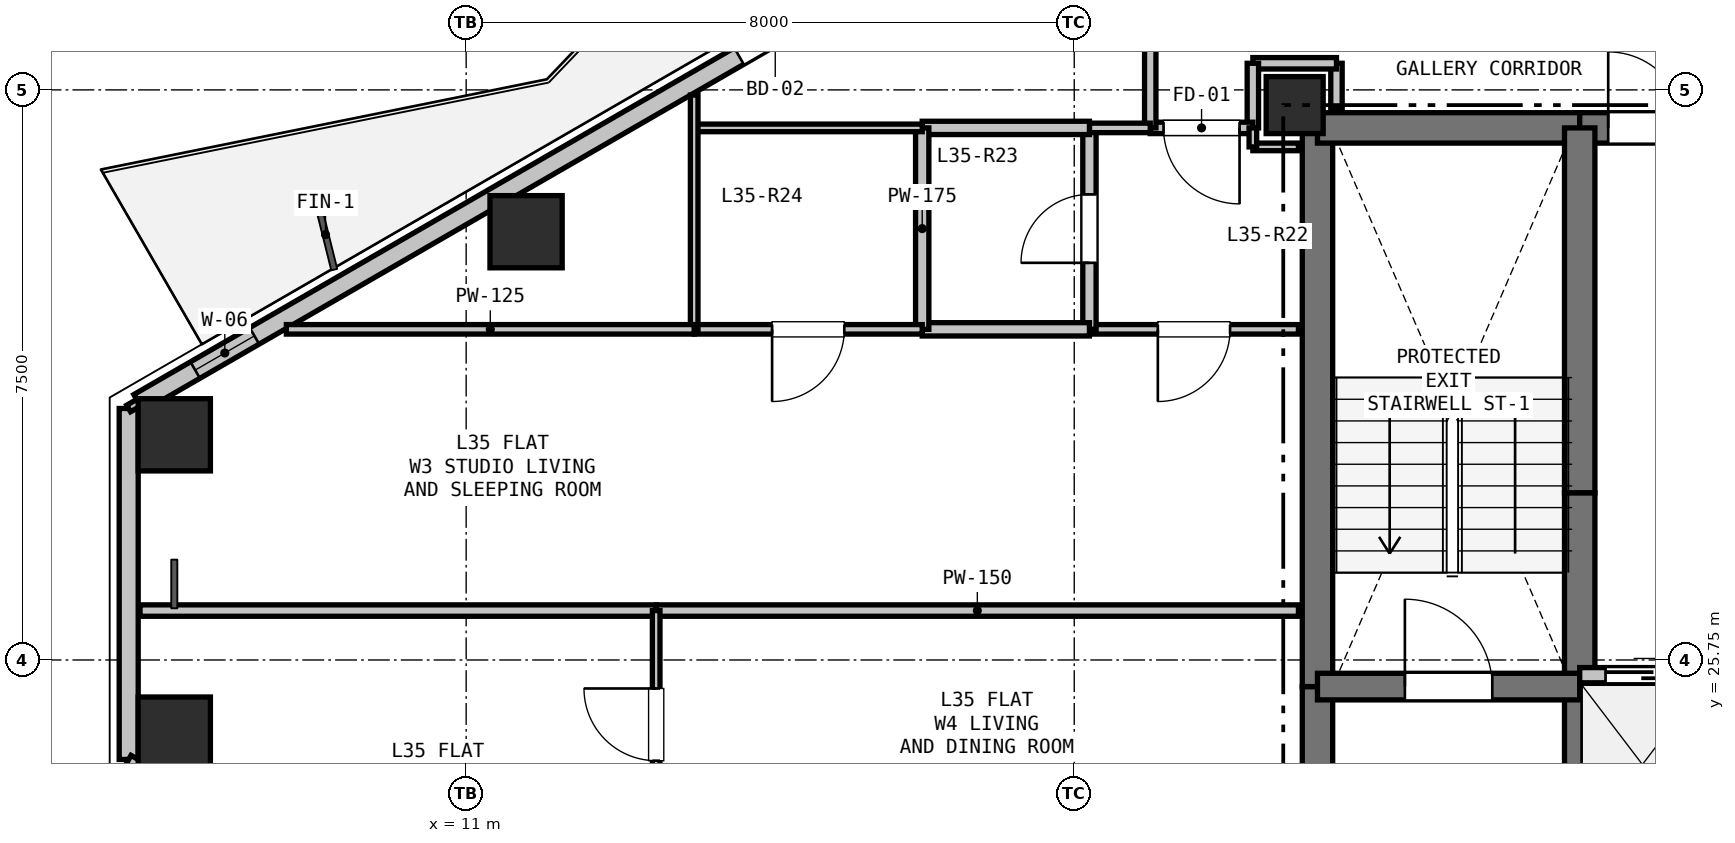
"""IFC4 building model, lengths in metres.
Left out: names, types, materials, properties, quantities, classifications, styles, units other than length and angle.
Written with IfcOpenShell. Run it as: python <this file> out.ifc"""

import sys

from ifc_helpers import new_model, si_unit, direction, frame, frame_2d, origin, origin_2d, place, context, subcontext, project, spatial, rectangle, hollow_rectangle, extrude, element, fill, save


model = new_model("IFC4")
c1 = context("Model", 3, precision=1e-05, world=origin(), true_north=direction((0.0, 1.0)))
c2 = subcontext(c1, "Body", "Model", "MODEL_VIEW")
j1 = project(units=[si_unit("LENGTHUNIT", "METRE"), si_unit("PLANEANGLEUNIT", "RADIAN")], contexts=[c1])
p1 = place(None, origin())
s1 = spatial("IfcSite", under=j1, at=p1, CompositionType="ELEMENT")
p2 = place(p1, origin())
s2 = spatial("IfcBuilding", under=s1, at=p2, CompositionType="ELEMENT")
p3 = place(p2, frame((0.0, 0.0, 127.8)))
s3 = spatial("IfcBuildingStorey", under=s2, at=p3, CompositionType="ELEMENT", Elevation=127.8)
p4 = place(p3, frame((21.9, 33.05, 0.0), z_axis=(0.0, 0.0, 1.0), x_axis=(1.0, 0.0, 0.0)))
e1 = element("IfcColumn", 1, at=p4, inside=s3, PredefinedType="COLUMN", context=c2, shape_type="SweptSolid", body=[
    extrude(rectangle(XDim=0.75, YDim=0.75, at=origin_2d()), origin(), (0.0, 0.0, 1.0), 3.3),
])
for number, where, z_axis, x_axis in (
    (2, (7.16, 28.712, 0.0), (0.0, 0.0, 1.0), (1.0, 0.0, 0.0)),
    (3, (11.788, 31.384, 0.0), (0.0, 0.0, 1.0), (1.0, 0.0, 0.0)),
    (4, (7.16, 24.788, 0.0), (0.0, 0.0, 1.0), (1.0, 0.0, 0.0)),
):
    element("IfcColumn", number, at=place(p3, frame(where, z_axis=z_axis, x_axis=x_axis)), inside=s3, PredefinedType="COLUMN", context=c2, shape_type="SweptSolid", body=[
        extrude(hollow_rectangle(XDim=0.95, YDim=0.95, WallThickness=0.028, at=origin_2d()), origin(), (0.0, 0.0, 1.0), 3.3),
    ])
p5 = place(p3, frame((6.56, 24.441, 0.0), z_axis=(0.0, 0.0, 1.0), x_axis=(0.0, 1.0, 0.0)))
e5 = element("IfcWall", 5, at=p5, inside=s3, PredefinedType="SOLIDWALL", context=c2, shape_type="SweptSolid", body=[
    extrude(rectangle(XDim=4.617, YDim=0.25, at=frame_2d((2.309, 0.0))), origin(), (0.0, 0.0, 1.0), 2.68),
])
p6 = place(p3, frame((6.69, 29.134, 0.0), z_axis=(0.0, 0.0, 1.0), x_axis=(0.866027848477, 0.499995765644, 0.0)))
e6 = element("IfcWall", 6, at=p6, inside=s3, PredefinedType="SOLIDWALL", context=c2, shape_type="SweptSolid", body=[
    extrude(rectangle(XDim=11.186, YDim=0.25, at=frame_2d((5.593, 0.0))), origin(), (0.0, 0.0, 1.0), 2.68),
])
p7 = place(p6, frame((9.122, 0.0, 0.0)))
e7 = element("IfcOpeningElement", 7, at=p7, cuts=e6, PredefinedType="OPENING", context=c2, shape_type="SweptSolid", body=[
    extrude(rectangle(XDim=1.1, YDim=2.1, at=frame_2d((0.55, 1.05))), frame((0.0, 0.135, 0.0), z_axis=(0.0, -1.0, 0.0), x_axis=(1.0, 0.0, 0.0)), (0.0, 0.0, 1.0), 0.27),
])
p8 = place(p6, frame((0.86, 0.0, 0.9)))
e8 = element("IfcOpeningElement", 8, at=p8, cuts=e6, PredefinedType="OPENING", context=c2, shape_type="SweptSolid", body=[
    extrude(rectangle(XDim=0.9, YDim=1.4, at=frame_2d((0.45, 0.7))), frame((0.0, 0.135, 0.0), z_axis=(0.0, -1.0, 0.0), x_axis=(1.0, 0.0, 0.0)), (0.0, 0.0, 1.0), 0.27),
])
p9 = place(p3, frame((16.378, 18.773, 0.0), z_axis=(0.0, 0.0, 1.0), x_axis=(-0.866027848477, 0.499995765644, 0.0)))
e9 = element("IfcWall", 9, at=p9, inside=s3, PredefinedType="SOLIDWALL", context=c2, shape_type="SweptSolid", body=[
    extrude(rectangle(XDim=11.186, YDim=0.25, at=frame_2d((5.593, 0.0))), origin(), (0.0, 0.0, 1.0), 2.68),
])
p10 = place(p9, frame((6.757, 0.0, 0.9)))
e10 = element("IfcOpeningElement", 10, at=p10, cuts=e9, PredefinedType="OPENING", context=c2, shape_type="SweptSolid", body=[
    extrude(rectangle(XDim=1.2, YDim=1.4, at=frame_2d((0.6, 0.7))), frame((0.0, 0.135, 0.0), z_axis=(0.0, -1.0, 0.0), x_axis=(1.0, 0.0, 0.0)), (0.0, 0.0, 1.0), 0.27),
])
p11 = place(p3, frame((22.2, 20.75, 0.0), z_axis=(0.0, 0.0, 1.0), x_axis=(0.0, 1.0, 0.0)))
e11 = element("IfcWall", 11, at=p11, inside=s3, PredefinedType="SHEAR", context=c2, shape_type="SweptSolid", body=[
    extrude(rectangle(XDim=4.65, YDim=0.4, at=frame_2d((2.325, 0.0))), origin(), (0.0, 0.0, 1.0), 3.06),
])
p12 = place(p3, frame((22.2, 25.4, 0.0), z_axis=(0.0, 0.0, 1.0), x_axis=(0.0, 1.0, 0.0)))
e12 = element("IfcWall", 12, at=p12, inside=s3, PredefinedType="SHEAR", context=c2, shape_type="SweptSolid", body=[
    extrude(rectangle(XDim=7.35, YDim=0.4, at=frame_2d((3.675, 0.0))), origin(), (0.0, 0.0, 1.0), 3.06),
])
p13 = place(p3, frame((22.2, 32.75, 0.0), z_axis=(0.0, 0.0, 1.0), x_axis=(1.0, 0.0, 0.0)))
e13 = element("IfcWall", 13, at=p13, inside=s3, PredefinedType="SHEAR", context=c2, shape_type="SweptSolid", body=[
    extrude(rectangle(XDim=3.45, YDim=0.4, at=frame_2d((1.725, 0.0))), origin(), (0.0, 0.0, 1.0), 3.06),
])
p14 = place(p3, frame((25.65, 32.75, 0.0), z_axis=(0.0, 0.0, 1.0), x_axis=(1.0, 0.0, 0.0)))
e14 = element("IfcWall", 14, at=p14, inside=s3, PredefinedType="SHEAR", context=c2, shape_type="SweptSolid", body=[
    extrude(rectangle(XDim=1.75, YDim=0.4, at=frame_2d((0.875, 0.0))), origin(), (0.0, 0.0, 1.0), 3.06),
])
p15 = place(p14, frame((0.375, 0.0, 0.0)))
e15 = element("IfcOpeningElement", 15, at=p15, cuts=e14, PredefinedType="OPENING", context=c2, shape_type="SweptSolid", body=[
    extrude(rectangle(XDim=1.0, YDim=2.15, at=frame_2d((0.5, 1.075))), frame((0.0, 0.21, 0.0), z_axis=(0.0, -1.0, 0.0), x_axis=(1.0, 0.0, 0.0)), (0.0, 0.0, 1.0), 0.42),
])
p16 = place(p3, frame((25.65, 22.75, 0.0), z_axis=(0.0, 0.0, 1.0), x_axis=(0.0, 1.0, 0.0)))
e16 = element("IfcWall", 16, at=p16, inside=s3, PredefinedType="SHEAR", context=c2, shape_type="SweptSolid", body=[
    extrude(rectangle(XDim=2.8, YDim=0.4, at=frame_2d((1.4, 0.0))), origin(), (0.0, 0.0, 1.0), 3.06),
])
p17 = place(p3, frame((25.65, 25.55, 0.0), z_axis=(0.0, 0.0, 1.0), x_axis=(0.0, 1.0, 0.0)))
e17 = element("IfcWall", 17, at=p17, inside=s3, PredefinedType="SHEAR", context=c2, shape_type="SweptSolid", body=[
    extrude(rectangle(XDim=2.4, YDim=0.4, at=frame_2d((1.2, 0.0))), origin(), (0.0, 0.0, 1.0), 3.06),
])
p18 = place(p3, frame((25.65, 27.95, 0.0), z_axis=(0.0, 0.0, 1.0), x_axis=(0.0, 1.0, 0.0)))
e18 = element("IfcWall", 18, at=p18, inside=s3, PredefinedType="SHEAR", context=c2, shape_type="SweptSolid", body=[
    extrude(rectangle(XDim=4.8, YDim=0.4, at=frame_2d((2.4, 0.0))), origin(), (0.0, 0.0, 1.0), 3.06),
])
p19 = place(p3, frame((22.2, 25.4, 0.0), z_axis=(0.0, 0.0, 1.0), x_axis=(1.0, 0.0, 0.0)))
e19 = element("IfcWall", 19, at=p19, inside=s3, PredefinedType="SHEAR", context=c2, shape_type="SweptSolid", body=[
    extrude(rectangle(XDim=3.45, YDim=0.35, at=frame_2d((1.725, 0.0))), origin(), (0.0, 0.0, 1.0), 3.06),
])
p20 = place(p19, frame((1.15, 0.0, 0.0)))
e20 = element("IfcOpeningElement", 20, at=p20, cuts=e19, PredefinedType="OPENING", context=c2, shape_type="SweptSolid", body=[
    extrude(rectangle(XDim=1.15, YDim=2.15, at=frame_2d((0.575, 1.075))), frame((0.0, 0.185, 0.0), z_axis=(0.0, -1.0, 0.0), x_axis=(1.0, 0.0, 0.0)), (0.0, 0.0, 1.0), 0.37),
])
p21 = place(p3, frame((25.65, 25.55, 0.0), z_axis=(0.0, 0.0, 1.0), x_axis=(1.0, 0.0, 0.0)))
e21 = element("IfcWall", 21, at=p21, inside=s3, PredefinedType="PARTITIONING", context=c2, shape_type="SweptSolid", body=[
    extrude(rectangle(XDim=4.95, YDim=0.2, at=frame_2d((2.475, 0.0))), origin(), (0.0, 0.0, 1.0), 3.06),
])
p22 = place(p21, frame((0.34, 0.0, 0.0)))
e22 = element("IfcOpeningElement", 22, at=p22, cuts=e21, PredefinedType="OPENING", context=c2, shape_type="SweptSolid", body=[
    extrude(rectangle(XDim=1.1, YDim=2.15, at=frame_2d((0.55, 1.075))), frame((0.0, 0.11, 0.0), z_axis=(0.0, -1.0, 0.0), x_axis=(1.0, 0.0, 0.0)), (0.0, 0.0, 1.0), 0.22),
])
p23 = place(p21, frame((1.99, 0.0, 0.0)))
e23 = element("IfcOpeningElement", 23, at=p23, cuts=e21, PredefinedType="OPENING", context=c2, shape_type="SweptSolid", body=[
    extrude(rectangle(XDim=1.1, YDim=2.15, at=frame_2d((0.55, 1.075))), frame((0.0, 0.11, 0.0), z_axis=(0.0, -1.0, 0.0), x_axis=(1.0, 0.0, 0.0)), (0.0, 0.0, 1.0), 0.22),
])
p24 = place(p21, frame((3.64, 0.0, 0.0)))
e24 = element("IfcOpeningElement", 24, at=p24, cuts=e21, PredefinedType="OPENING", context=c2, shape_type="SweptSolid", body=[
    extrude(rectangle(XDim=1.1, YDim=2.15, at=frame_2d((0.55, 1.075))), frame((0.0, 0.11, 0.0), z_axis=(0.0, -1.0, 0.0), x_axis=(1.0, 0.0, 0.0)), (0.0, 0.0, 1.0), 0.22),
])
p25 = place(p3, frame((22.45, 33.0, 0.0), z_axis=(0.0, 0.0, 1.0), x_axis=(0.0, 1.0, 0.0)))
e25 = element("IfcWall", 25, at=p25, inside=s3, PredefinedType="PARTITIONING", context=c2, shape_type="SweptSolid", body=[
    extrude(rectangle(XDim=0.6, YDim=0.15, at=frame_2d((0.3, 0.0))), origin(), (0.0, 0.0, 1.0), 2.508),
])
p26 = place(p3, frame((22.45, 33.6, 0.0), z_axis=(0.0, 0.0, 1.0), x_axis=(-1.0, 0.0, 0.0)))
e26 = element("IfcWall", 26, at=p26, inside=s3, PredefinedType="PARTITIONING", context=c2, shape_type="SweptSolid", body=[
    extrude(rectangle(XDim=1.1, YDim=0.15, at=frame_2d((0.55, 0.0))), origin(), (0.0, 0.0, 1.0), 3.06),
])
p27 = place(p3, frame((21.35, 33.6, 0.0), z_axis=(0.0, 0.0, 1.0), x_axis=(0.0, -1.0, 0.0)))
e27 = element("IfcWall", 27, at=p27, inside=s3, PredefinedType="PARTITIONING", context=c2, shape_type="SweptSolid", body=[
    extrude(rectangle(XDim=0.85, YDim=0.15, at=frame_2d((0.425, 0.0))), origin(), (0.0, 0.0, 1.0), 2.433),
])
p28 = place(p3, frame((21.35, 32.75, 0.0), z_axis=(0.0, 0.0, 1.0), x_axis=(-1.0, 0.0, 0.0)))
e28 = element("IfcWall", 28, at=p28, inside=s3, PredefinedType="PARTITIONING", context=c2, shape_type="SweptSolid", body=[
    extrude(rectangle(XDim=1.35, YDim=0.15, at=frame_2d((0.675, 0.0))), origin(), (0.0, 0.0, 1.0), 2.433),
])
p29 = place(p28, frame((0.175, 0.0, 0.0)))
e29 = element("IfcOpeningElement", 29, at=p29, cuts=e28, PredefinedType="OPENING", context=c2, shape_type="SweptSolid", body=[
    extrude(rectangle(XDim=1.0, YDim=2.15, at=frame_2d((0.5, 1.075))), frame((0.0, 0.085, 0.0), z_axis=(0.0, -1.0, 0.0), x_axis=(1.0, 0.0, 0.0)), (0.0, 0.0, 1.0), 0.17),
])
p30 = place(p3, frame((20.0, 32.75, 0.0), z_axis=(0.0, 0.0, 1.0), x_axis=(0.0, 1.0, 0.0)))
e30 = element("IfcWall", 30, at=p30, inside=s3, PredefinedType="PARTITIONING", context=c2, shape_type="SweptSolid", body=[
    extrude(rectangle(XDim=2.6, YDim=0.15, at=frame_2d((1.3, 0.0))), origin(), (0.0, 0.0, 1.0), 2.433),
])
p31 = place(p3, frame((21.35, 32.5, 0.0), z_axis=(0.0, 0.0, 1.0), x_axis=(1.0, 0.0, 0.0)))
e31 = element("IfcWall", 31, at=p31, inside=s3, PredefinedType="PARTITIONING", context=c2, shape_type="SweptSolid", body=[
    extrude(rectangle(XDim=0.6, YDim=0.1, at=frame_2d((0.3, 0.0))), origin(), (0.0, 0.0, 1.0), 2.508),
])
p32 = place(p3, frame((21.95, 30.1, 0.0), z_axis=(0.0, 0.0, 1.0), x_axis=(-1.0, 0.0, 0.0)))
e32 = element("IfcWall", 32, at=p32, inside=s3, PredefinedType="PARTITIONING", context=c2, shape_type="SweptSolid", body=[
    extrude(rectangle(XDim=2.75, YDim=0.125, at=frame_2d((1.375, 0.0))), origin(), (0.0, 0.0, 1.0), 2.508),
])
p33 = place(p32, frame((0.9, 0.0, 0.0)))
e33 = element("IfcOpeningElement", 33, at=p33, cuts=e32, PredefinedType="OPENING", context=c2, shape_type="SweptSolid", body=[
    extrude(rectangle(XDim=0.95, YDim=2.1, at=frame_2d((0.475, 1.05))), frame((0.0, 0.073, 0.0), z_axis=(0.0, -1.0, 0.0), x_axis=(1.0, 0.0, 0.0)), (0.0, 0.0, 1.0), 0.145),
])
p34 = place(p3, frame((19.2, 30.1, 0.0), z_axis=(0.0, 0.0, 1.0), x_axis=(0.0, 1.0, 0.0)))
e34 = element("IfcWall", 34, at=p34, inside=s3, PredefinedType="PLUMBINGWALL", context=c2, shape_type="SweptSolid", body=[
    extrude(rectangle(XDim=2.65, YDim=0.175, at=frame_2d((1.325, 0.0))), origin(), (0.0, 0.0, 1.0), 2.433),
])
p35 = place(p34, frame((0.875, 0.0, 0.0)))
e35 = element("IfcOpeningElement", 35, at=p35, cuts=e34, PredefinedType="OPENING", context=c2, shape_type="SweptSolid", body=[
    extrude(rectangle(XDim=0.9, YDim=2.1, at=frame_2d((0.45, 1.05))), frame((0.0, 0.097, 0.0), z_axis=(0.0, -1.0, 0.0), x_axis=(1.0, 0.0, 0.0)), (0.0, 0.0, 1.0), 0.195),
])
p36 = place(p3, frame((19.2, 32.75, 0.0), z_axis=(0.0, 0.0, 1.0), x_axis=(1.0, 0.0, 0.0)))
e36 = element("IfcWall", 36, at=p36, inside=s3, PredefinedType="PARTITIONING", context=c2, shape_type="SweptSolid", body=[
    extrude(rectangle(XDim=0.8, YDim=0.125, at=frame_2d((0.4, 0.0))), origin(), (0.0, 0.0, 1.0), 2.433),
])
p37 = place(p3, frame((21.35, 32.75, 0.0), z_axis=(0.0, 0.0, 1.0), x_axis=(0.0, -1.0, 0.0)))
e37 = element("IfcWall", 37, at=p37, inside=s3, PredefinedType="PARTITIONING", context=c2, shape_type="SweptSolid", body=[
    extrude(rectangle(XDim=0.25, YDim=0.1, at=frame_2d((0.125, 0.0))), origin(), (0.0, 0.0, 1.0), 3.06),
])
p38 = place(p3, frame((17.0, 32.75, 0.0), z_axis=(0.0, 0.0, 1.0), x_axis=(1.0, 0.0, 0.0)))
e38 = element("IfcWall", 38, at=p38, inside=s3, PredefinedType="PLUMBINGWALL", context=c2, shape_type="SweptSolid", body=[
    extrude(rectangle(XDim=2.2, YDim=0.175, at=frame_2d((1.1, 0.0))), origin(), (0.0, 0.0, 1.0), 2.433),
])
p39 = place(p3, frame((19.2, 30.1, 0.0), z_axis=(0.0, 0.0, 1.0), x_axis=(-1.0, 0.0, 0.0)))
e39 = element("IfcWall", 39, at=p39, inside=s3, PredefinedType="PLUMBINGWALL", context=c2, shape_type="SweptSolid", body=[
    extrude(rectangle(XDim=2.2, YDim=0.175, at=frame_2d((1.1, 0.0))), origin(), (0.0, 0.0, 1.0), 3.06),
])
p40 = place(p3, frame((17.0, 30.1, 0.0), z_axis=(0.0, 0.0, 1.0), x_axis=(0.0, 1.0, 0.0)))
e40 = element("IfcWall", 40, at=p40, inside=s3, PredefinedType="PLUMBINGWALL", context=c2, shape_type="SweptSolid", body=[
    extrude(rectangle(XDim=2.65, YDim=0.175, at=frame_2d((1.325, 0.0))), origin(), (0.0, 0.0, 1.0), 2.433),
])
p41 = place(p3, frame((14.0, 32.75, 0.0), z_axis=(0.0, 0.0, 1.0), x_axis=(1.0, 0.0, 0.0)))
e41 = element("IfcWall", 41, at=p41, inside=s3, PredefinedType="PARTITIONING", context=c2, shape_type="SweptSolid", body=[
    extrude(rectangle(XDim=3.0, YDim=0.1, at=frame_2d((1.5, 0.0))), origin(), (0.0, 0.0, 1.0), 2.365),
])
p42 = place(p3, frame((17.0, 30.1, 0.0), z_axis=(0.0, 0.0, 1.0), x_axis=(-1.0, 0.0, 0.0)))
e42 = element("IfcWall", 42, at=p42, inside=s3, PredefinedType="PARTITIONING", context=c2, shape_type="SweptSolid", body=[
    extrude(rectangle(XDim=3.0, YDim=0.125, at=frame_2d((1.5, 0.0))), origin(), (0.0, 0.0, 1.0), 3.06),
])
p43 = place(p42, frame((1.025, 0.0, 0.0)))
e43 = element("IfcOpeningElement", 43, at=p43, cuts=e42, PredefinedType="OPENING", context=c2, shape_type="SweptSolid", body=[
    extrude(rectangle(XDim=0.95, YDim=2.1, at=frame_2d((0.475, 1.05))), frame((0.0, 0.073, 0.0), z_axis=(0.0, -1.0, 0.0), x_axis=(1.0, 0.0, 0.0)), (0.0, 0.0, 1.0), 0.145),
])
p44 = place(p3, frame((14.0, 30.1, 0.0), z_axis=(0.0, 0.0, 1.0), x_axis=(0.0, 1.0, 0.0)))
e44 = element("IfcWall", 44, at=p44, inside=s3, PredefinedType="PARTITIONING", context=c2, shape_type="SweptSolid", body=[
    extrude(rectangle(XDim=3.082, YDim=0.1, at=frame_2d((1.541, 0.0))), origin(), (0.0, 0.0, 1.0), 2.365),
])
p45 = place(p3, frame((8.635, 30.1, 0.0), z_axis=(0.0, 0.0, 1.0), x_axis=(1.0, 0.0, 0.0)))
e45 = element("IfcWall", 45, at=p45, inside=s3, PredefinedType="PARTITIONING", context=c2, shape_type="SweptSolid", body=[
    extrude(rectangle(XDim=5.365, YDim=0.125, at=frame_2d((2.683, 0.0))), origin(), (0.0, 0.0, 1.0), 2.724),
])
p46 = place(p3, frame((21.95, 26.4, 0.0), z_axis=(0.0, 0.0, 1.0), x_axis=(-1.0, 0.0, 0.0)))
e46 = element("IfcWall", 46, at=p46, inside=s3, PredefinedType="PARTITIONING", context=c2, shape_type="SweptSolid", body=[
    extrude(rectangle(XDim=8.45, YDim=0.15, at=frame_2d((4.225, 0.0))), origin(), (0.0, 0.0, 1.0), 2.508),
])
p47 = place(p3, frame((13.5, 26.4, 0.0), z_axis=(0.0, 0.0, 1.0), x_axis=(-1.0, 0.0, 0.0)))
e47 = element("IfcWall", 47, at=p47, inside=s3, PredefinedType="PARTITIONING", context=c2, shape_type="SweptSolid", body=[
    extrude(rectangle(XDim=6.791, YDim=0.15, at=frame_2d((3.396, 0.0))), origin(), (0.0, 0.0, 1.0), 2.724),
])
p48 = place(p3, frame((6.56, 29.059, 0.0), z_axis=(0.0, 0.0, 1.0), x_axis=(0.866131372301, 0.499816412211, 0.0)))
e48 = element("IfcWall", 48, at=p48, inside=s3, PredefinedType="PARTITIONING", context=c2, shape_type="SweptSolid", body=[
    extrude(rectangle(XDim=0.15, YDim=0.1, at=frame_2d((0.075, 0.0))), origin(), (0.0, 0.0, 1.0), 3.06),
])
p49 = place(p3, frame((13.5, 23.4, 0.0), z_axis=(0.0, 0.0, 1.0), x_axis=(0.0, 1.0, 0.0)))
e49 = element("IfcWall", 49, at=p49, inside=s3, PredefinedType="PARTITIONING", context=c2, shape_type="SweptSolid", body=[
    extrude(rectangle(XDim=3.0, YDim=0.1, at=frame_2d((1.5, 0.0))), origin(), (0.0, 0.0, 1.0), 3.06),
])
p50 = place(p49, frame((1.025, 0.0, 0.0)))
e50 = element("IfcOpeningElement", 50, at=p50, cuts=e49, PredefinedType="OPENING", context=c2, shape_type="SweptSolid", body=[
    extrude(rectangle(XDim=0.95, YDim=2.1, at=frame_2d((0.475, 1.05))), frame((0.0, 0.06, 0.0), z_axis=(0.0, -1.0, 0.0), x_axis=(1.0, 0.0, 0.0)), (0.0, 0.0, 1.0), 0.12),
])
p51 = place(p3, frame((6.69, 24.366, 0.0), z_axis=(0.0, 0.0, 1.0), x_axis=(-0.866131372301, 0.499816412211, 0.0)))
e51 = element("IfcWall", 51, at=p51, inside=s3, PredefinedType="PARTITIONING", context=c2, shape_type="SweptSolid", body=[
    extrude(rectangle(XDim=0.15, YDim=0.125, at=frame_2d((0.075, 0.0))), origin(), (0.0, 0.0, 1.0), 3.06),
])
p52 = place(p7, origin())
e52 = element("IfcDoor", 52, at=p52, inside=s3, OperationType="SINGLE_SWING_RIGHT", PredefinedType="DOOR", context=c2, shape_type="SweptSolid", body=[
    extrude(rectangle(XDim=1.1, YDim=2.1, at=frame_2d((0.55, 1.05))), frame((0.0, 0.025, 0.0), z_axis=(0.0, -1.0, 0.0), x_axis=(1.0, 0.0, 0.0)), (0.0, 0.0, 1.0), 0.05),
])
fill(e7, e52)
p53 = place(p8, origin())
e53 = element("IfcWindow", 53, at=p53, inside=s3, PartitioningType="SINGLE_PANEL", PredefinedType="WINDOW", context=c2, shape_type="SweptSolid", body=[
    extrude(rectangle(XDim=0.9, YDim=1.4, at=frame_2d((0.45, 0.7))), frame((0.0, 0.03, 0.0), z_axis=(0.0, -1.0, 0.0), x_axis=(1.0, 0.0, 0.0)), (0.0, 0.0, 1.0), 0.06),
])
fill(e8, e53)
p54 = place(p22, origin())
e54 = element("IfcDoor", 54, at=p54, inside=s3, OperationType="SLIDING_TO_LEFT", PredefinedType="DOOR", context=c2, shape_type="SweptSolid", body=[
    extrude(rectangle(XDim=1.1, YDim=2.15, at=frame_2d((0.55, 1.075))), frame((0.0, 0.025, 0.0), z_axis=(0.0, -1.0, 0.0), x_axis=(1.0, 0.0, 0.0)), (0.0, 0.0, 1.0), 0.05),
])
fill(e22, e54)
p55 = place(p15, origin())
e55 = element("IfcDoor", 55, at=p55, inside=s3, OperationType="SINGLE_SWING_LEFT", PredefinedType="DOOR", context=c2, shape_type="SweptSolid", body=[
    extrude(rectangle(XDim=1.0, YDim=2.15, at=frame_2d((0.5, 1.075))), frame((0.0, 0.025, 0.0), z_axis=(0.0, -1.0, 0.0), x_axis=(1.0, 0.0, 0.0)), (0.0, 0.0, 1.0), 0.05),
])
fill(e15, e55)
p56 = place(p20, origin())
e56 = element("IfcDoor", 56, at=p56, inside=s3, OperationType="SINGLE_SWING_LEFT", PredefinedType="DOOR", context=c2, shape_type="SweptSolid", body=[
    extrude(rectangle(XDim=1.15, YDim=2.15, at=frame_2d((0.575, 1.075))), frame((0.0, 0.025, 0.0), z_axis=(0.0, -1.0, 0.0), x_axis=(1.0, 0.0, 0.0)), (0.0, 0.0, 1.0), 0.05),
])
fill(e20, e56)
p57 = place(p29, origin())
e57 = element("IfcDoor", 57, at=p57, inside=s3, OperationType="SINGLE_SWING_LEFT", PredefinedType="DOOR", context=c2, shape_type="SweptSolid", body=[
    extrude(rectangle(XDim=1.0, YDim=2.15, at=frame_2d((0.5, 1.075))), frame((0.0, 0.025, 0.0), z_axis=(0.0, -1.0, 0.0), x_axis=(1.0, 0.0, 0.0)), (0.0, 0.0, 1.0), 0.05),
])
fill(e29, e57)
p58 = place(p35, origin())
e58 = element("IfcDoor", 58, at=p58, inside=s3, OperationType="SINGLE_SWING_LEFT", PredefinedType="DOOR", context=c2, shape_type="SweptSolid", body=[
    extrude(rectangle(XDim=0.9, YDim=2.1, at=frame_2d((0.45, 1.05))), frame((0.0, 0.025, 0.0), z_axis=(0.0, -1.0, 0.0), x_axis=(1.0, 0.0, 0.0)), (0.0, 0.0, 1.0), 0.05),
])
fill(e35, e58)
p59 = place(p33, origin())
e59 = element("IfcDoor", 59, at=p59, inside=s3, OperationType="SINGLE_SWING_RIGHT", PredefinedType="DOOR", context=c2, shape_type="SweptSolid", body=[
    extrude(rectangle(XDim=0.95, YDim=2.1, at=frame_2d((0.475, 1.05))), frame((0.0, 0.025, 0.0), z_axis=(0.0, -1.0, 0.0), x_axis=(1.0, 0.0, 0.0)), (0.0, 0.0, 1.0), 0.05),
])
fill(e33, e59)
p60 = place(p43, origin())
e60 = element("IfcDoor", 60, at=p60, inside=s3, OperationType="SINGLE_SWING_RIGHT", PredefinedType="DOOR", context=c2, shape_type="SweptSolid", body=[
    extrude(rectangle(XDim=0.95, YDim=2.1, at=frame_2d((0.475, 1.05))), frame((0.0, 0.025, 0.0), z_axis=(0.0, -1.0, 0.0), x_axis=(1.0, 0.0, 0.0)), (0.0, 0.0, 1.0), 0.05),
])
fill(e43, e60)
p61 = place(p50, origin())
e61 = element("IfcDoor", 61, at=p61, inside=s3, OperationType="SINGLE_SWING_RIGHT", PredefinedType="DOOR", context=c2, shape_type="SweptSolid", body=[
    extrude(rectangle(XDim=0.95, YDim=2.1, at=frame_2d((0.475, 1.05))), frame((0.0, 0.025, 0.0), z_axis=(0.0, -1.0, 0.0), x_axis=(1.0, 0.0, 0.0)), (0.0, 0.0, 1.0), 0.05),
])
fill(e50, e61)
save(model, sys.argv[1])
